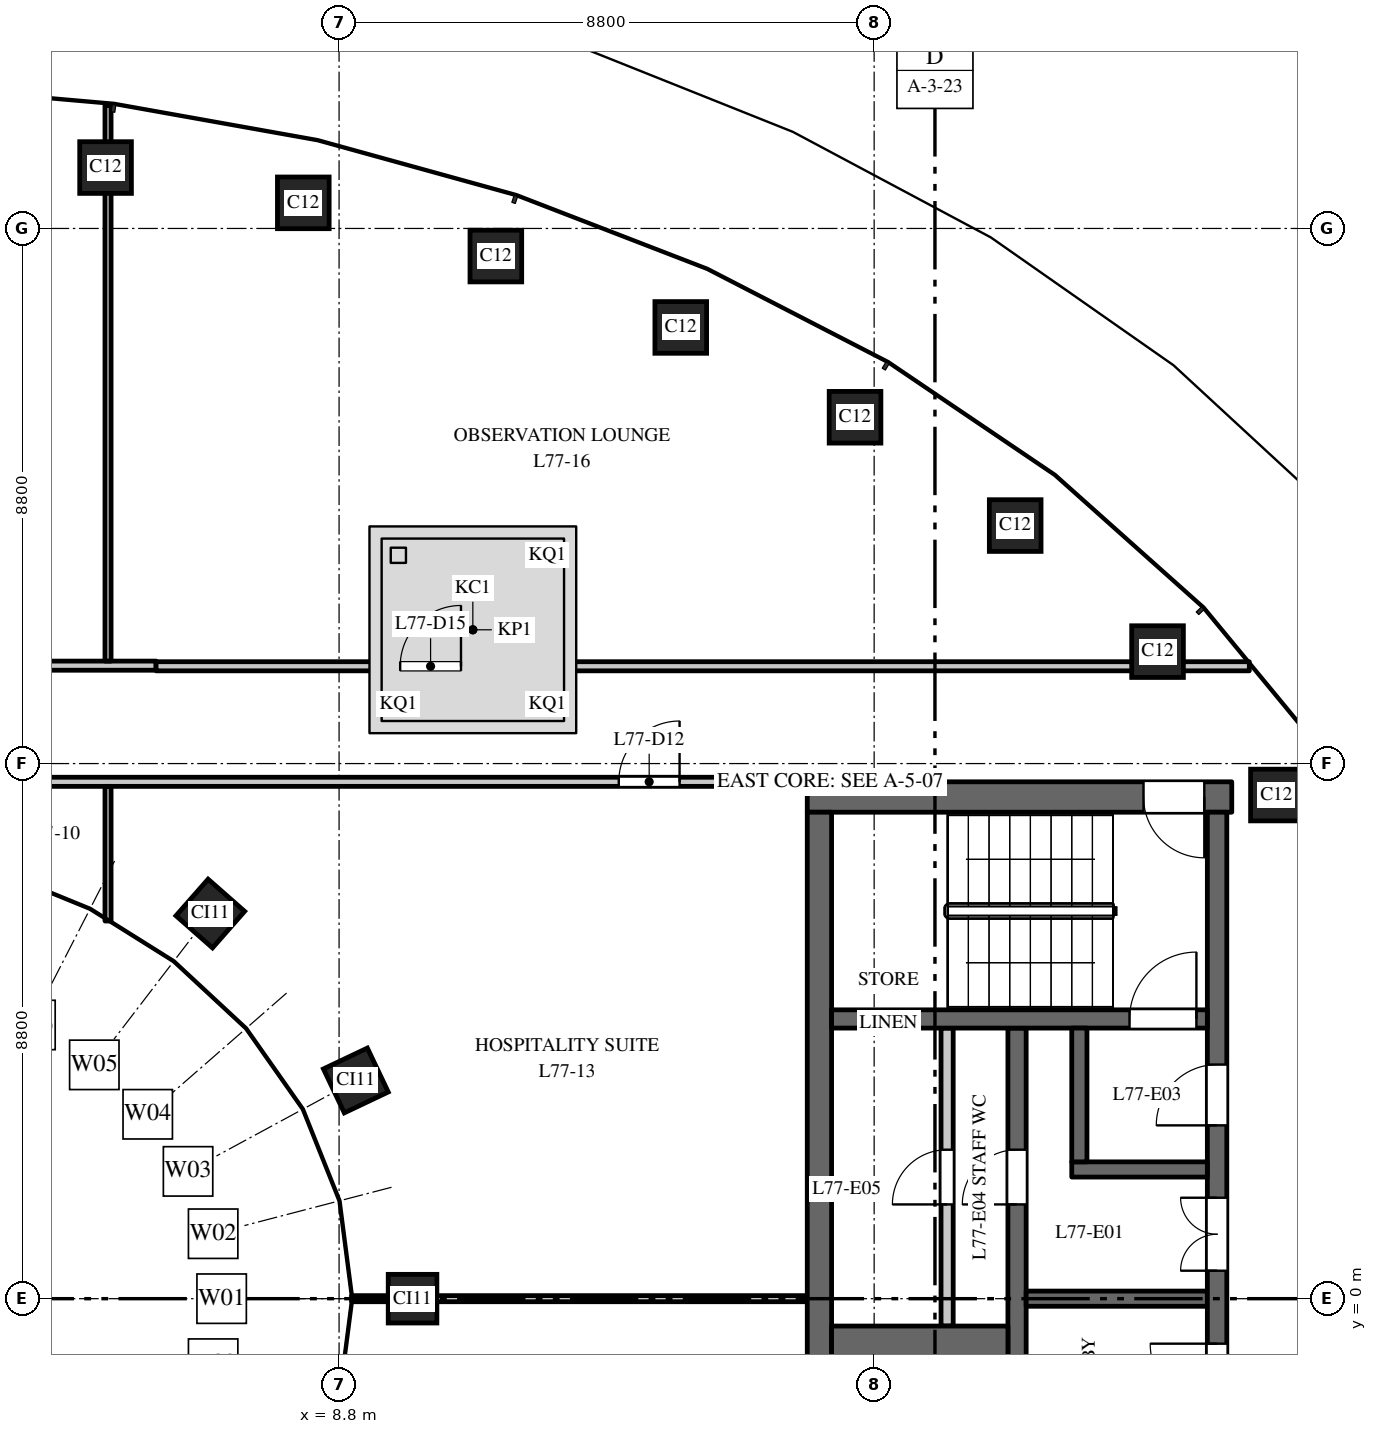
"""IFC4 building model, lengths in metres.
Left out: names, types, materials, properties, quantities, classifications, styles, units other than length and angle.
Written with IfcOpenShell. Run it as: python <this file> out.ifc"""

import sys

from ifc_helpers import new_model, si_unit, direction, frame, frame_2d, origin, origin_2d, place, context, subcontext, project, spatial, rectangle, extrude, element, fill, save


model = new_model("IFC4")
c1 = context("Model", 3, precision=1e-05, world=origin(), true_north=direction((0.0, 1.0)))
c2 = subcontext(c1, "Body", "Model", "MODEL_VIEW")
j1 = project(units=[si_unit("LENGTHUNIT", "METRE"), si_unit("PLANEANGLEUNIT", "RADIAN")], contexts=[c1])
p1 = place(None, origin())
s1 = spatial("IfcSite", under=j1, at=p1, CompositionType="ELEMENT")
p2 = place(p1, origin())
s2 = spatial("IfcBuilding", under=s1, at=p2, CompositionType="ELEMENT")
p3 = place(p2, frame((0.0, 0.0, 351.0)))
s3 = spatial("IfcBuildingStorey", under=s2, at=p3, CompositionType="ELEMENT", Elevation=351.0)
p4 = place(p3, frame((26.922, 0.0, 0.024), z_axis=(-0.671748348073, 0.0, 0.740779425242), x_axis=(0.0, -1.0, 0.0)))
e1 = element("IfcColumn", 1, at=p4, inside=s3, PredefinedType="COLUMN", context=c2, shape_type="SweptSolid", body=[
    extrude(rectangle(XDim=0.85, YDim=0.85, at=origin_2d()), origin(), (0.0, 0.0, 1.0), 7.392),
])
p5 = place(p3, frame((26.605, 2.884, 0.024), z_axis=(-0.663002424258, -0.107229988497, 0.740897776346), x_axis=(0.159659238674, -0.987172187365, 0.0)))
e2 = element("IfcColumn", 2, at=p5, inside=s3, PredefinedType="COLUMN", context=c2, shape_type="SweptSolid", body=[
    extrude(rectangle(XDim=0.85, YDim=0.85, at=origin_2d()), origin(), (0.0, 0.0, 1.0), 7.39),
])
p6 = place(p3, frame((25.682, 5.672, 0.058), z_axis=(-0.281200724754, -0.092390850742, 0.955191123858), x_axis=(0.312142088562, -0.950035429102, 0.0)))
e3 = element("IfcColumn", 3, at=p6, inside=s3, PredefinedType="COLUMN", context=c2, shape_type="SweptSolid", body=[
    extrude(rectangle(XDim=0.85, YDim=0.85, at=origin_2d()), origin(), (0.0, 0.0, 1.0), 5.697),
])
p7 = place(p3, frame((24.216, 8.282, 0.121), z_axis=(-0.025317754226, -0.012794994071, 0.999597568748), x_axis=(0.451048184688, -0.89249959949, 0.0)))
e4 = element("IfcColumn", 4, at=p7, inside=s3, PredefinedType="COLUMN", context=c2, shape_type="SweptSolid", body=[
    extrude(rectangle(XDim=0.85, YDim=0.85, at=origin_2d()), origin(), (0.0, 0.0, 1.0), 5.381),
])
p8 = place(p3, frame((22.261, 10.641, 0.02), z_axis=(-0.376654859375, -0.265757737453, 0.887414188467), x_axis=(0.57651482377, -0.817086689387, 0.0)))
e5 = element("IfcColumn", 5, at=p8, inside=s3, PredefinedType="COLUMN", context=c2, shape_type="SweptSolid", body=[
    extrude(rectangle(XDim=0.85, YDim=0.85, at=origin_2d()), origin(), (0.0, 0.0, 1.0), 6.175),
])
p9 = place(p3, frame((19.92, 12.714, 0.024), z_axis=(-0.48918887633, -0.459337710272, 0.7414196593), x_axis=(0.684514461897, -0.728999280832, 0.0)))
e6 = element("IfcColumn", 6, at=p9, inside=s3, PredefinedType="COLUMN", context=c2, shape_type="SweptSolid", body=[
    extrude(rectangle(XDim=0.85, YDim=0.85, at=origin_2d()), origin(), (0.0, 0.0, 1.0), 7.385),
])
p10 = place(p3, frame((17.286, 14.495, 0.024), z_axis=(-0.423361918772, -0.520740448808, 0.741346120722), x_axis=(0.77592413996, -0.630826227282, 0.0)))
e7 = element("IfcColumn", 7, at=p10, inside=s3, PredefinedType="COLUMN", context=c2, shape_type="SweptSolid", body=[
    extrude(rectangle(XDim=0.85, YDim=0.85, at=origin_2d()), origin(), (0.0, 0.0, 1.0), 7.386),
])
p11 = place(p3, frame((14.419, 15.972, 0.024), z_axis=(-0.352401023351, -0.571317311327, 0.741221996786), x_axis=(0.851111840755, -0.524984413604, 0.0)))
e8 = element("IfcColumn", 8, at=p11, inside=s3, PredefinedType="COLUMN", context=c2, shape_type="SweptSolid", body=[
    extrude(rectangle(XDim=0.85, YDim=0.85, at=origin_2d()), origin(), (0.0, 0.0, 1.0), 7.387),
])
p12 = place(p3, frame((11.378, 17.146, 0.024), z_axis=(-0.277631294914, -0.611304327055, 0.741099105254), x_axis=(0.910497899189, -0.41351369454, 0.0)))
e9 = element("IfcColumn", 9, at=p12, inside=s3, PredefinedType="COLUMN", context=c2, shape_type="SweptSolid", body=[
    extrude(rectangle(XDim=0.85, YDim=0.85, at=origin_2d()), origin(), (0.0, 0.0, 1.0), 7.388),
])
p13 = place(p3, frame((8.212, 18.021, 0.024), z_axis=(-0.200149570862, -0.640987425601, 0.74099613326), x_axis=(0.954547364195, -0.298059271805, 0.0)))
e10 = element("IfcColumn", 10, at=p13, inside=s3, PredefinedType="COLUMN", context=c2, shape_type="SweptSolid", body=[
    extrude(rectangle(XDim=0.85, YDim=0.85, at=origin_2d()), origin(), (0.0, 0.0, 1.0), 7.389),
])
p14 = place(p3, frame((4.96, 18.602, 0.024), z_axis=(-0.120810316709, -0.660641157657, 0.740917085905), x_axis=(0.983687598335, -0.179885265882, 0.0)))
e11 = element("IfcColumn", 11, at=p14, inside=s3, PredefinedType="COLUMN", context=c2, shape_type="SweptSolid", body=[
    extrude(rectangle(XDim=0.85, YDim=0.85, at=origin_2d()), origin(), (0.0, 0.0, 1.0), 7.39),
])
for number, where, z_axis, x_axis in (
    (12, (10.008, 0.0, 0.0), (0.0, 0.0, 1.0), (0.0, 1.0, 0.0)),
    (13, (9.076, 3.588, 0.0), (0.0, 0.0, 1.0), (-0.429, 0.903, 0.0)),
    (14, (6.682, 6.334, 0.0), (0.0, 0.0, 1.0), (-0.751, 0.66, 0.0)),
):
    element("IfcColumn", number, at=place(p3, frame(where, z_axis=z_axis, x_axis=x_axis)), inside=s3, PredefinedType="COLUMN", context=c2, shape_type="SweptSolid", body=[
        extrude(rectangle(XDim=0.8, YDim=0.8, at=origin_2d()), origin(), (0.0, 0.0, 1.0), 5.5),
    ])
p15 = place(p3, frame((16.5, 8.25, 0.0), z_axis=(0.0, 0.0, 1.0), x_axis=(1.0, 0.0, 0.0)))
e15 = element("IfcWall", 15, at=p15, inside=s3, PredefinedType="SHEAR", context=c2, shape_type="SweptSolid", body=[
    extrude(rectangle(XDim=6.981, YDim=0.5, at=frame_2d((3.491, 0.0))), origin(), (0.0, 0.0, 1.0), 5.3),
])
p16 = place(p15, frame((5.53, 0.0, 0.0)))
e16 = element("IfcOpeningElement", 16, at=p16, cuts=e15, PredefinedType="OPENING", context=c2, shape_type="SweptSolid", body=[
    extrude(rectangle(XDim=1.0, YDim=2.1, at=frame_2d((0.5, 1.05))), frame((0.0, 0.26, 0.0), z_axis=(0.0, -1.0, 0.0), x_axis=(1.0, 0.0, 0.0)), (0.0, 0.0, 1.0), 0.52),
])
p17 = place(p3, frame((18.8, -0.45, 0.0), z_axis=(0.0, 0.0, 1.0), x_axis=(0.0, 1.0, 0.0)))
e17 = element("IfcWall", 17, at=p17, inside=s3, PredefinedType="PARTITIONING", context=c2, shape_type="SweptSolid", body=[
    extrude(rectangle(XDim=4.9, YDim=0.2, at=frame_2d((2.45, 0.0))), origin(), (0.0, 0.0, 1.0), 4.5),
])
p18 = place(p17, frame((2.0, 0.0, 0.0)))
e18 = element("IfcOpeningElement", 18, at=p18, cuts=e17, PredefinedType="OPENING", context=c2, shape_type="SweptSolid", body=[
    extrude(rectangle(XDim=0.9, YDim=2.1, at=frame_2d((0.45, 1.05))), frame((0.0, 0.11, 0.0), z_axis=(0.0, -1.0, 0.0), x_axis=(1.0, 0.0, 0.0)), (0.0, 0.0, 1.0), 0.22),
])
p19 = place(p3, frame((19.95, -4.45, 0.0), z_axis=(0.0, 0.0, 1.0), x_axis=(0.0, 1.0, 0.0)))
e19 = element("IfcWall", 19, at=p19, inside=s3, PredefinedType="SHEAR", context=c2, shape_type="SweptSolid", body=[
    extrude(rectangle(XDim=8.9, YDim=0.3, at=frame_2d((4.45, 0.0))), origin(), (0.0, 0.0, 1.0), 5.3),
])
p20 = place(p19, frame((0.775, 0.0, 0.0)))
e20 = element("IfcOpeningElement", 20, at=p20, cuts=e19, PredefinedType="OPENING", context=c2, shape_type="SweptSolid", body=[
    extrude(rectangle(XDim=1.2, YDim=2.1, at=frame_2d((0.6, 1.05))), frame((0.0, 0.16, 0.0), z_axis=(0.0, -1.0, 0.0), x_axis=(1.0, 0.0, 0.0)), (0.0, 0.0, 1.0), 0.32),
])
p21 = place(p19, frame((6.0, 0.0, 0.0)))
e21 = element("IfcOpeningElement", 21, at=p21, cuts=e19, PredefinedType="OPENING", context=c2, shape_type="SweptSolid", body=[
    extrude(rectangle(XDim=0.9, YDim=2.1, at=frame_2d((0.45, 1.05))), frame((0.0, 0.16, 0.0), z_axis=(0.0, -1.0, 0.0), x_axis=(1.0, 0.0, 0.0)), (0.0, 0.0, 1.0), 0.32),
])
p22 = place(p3, frame((20.1, 0.0, 0.0), z_axis=(0.0, 0.0, 1.0), x_axis=(1.0, 0.0, 0.0)))
e22 = element("IfcWall", 22, at=p22, inside=s3, PredefinedType="SHEAR", context=c2, shape_type="SweptSolid", body=[
    extrude(rectangle(XDim=2.98, YDim=0.25, at=frame_2d((1.49, 0.0))), origin(), (0.0, 0.0, 1.0), 5.3),
])
p23 = place(p3, frame((16.7, -8.0, 0.0), z_axis=(0.0, 0.0, 1.0), x_axis=(0.0, 1.0, 0.0)))
e23 = element("IfcWall", 23, at=p23, inside=s3, PredefinedType="SHEAR", context=c2, shape_type="SweptSolid", body=[
    extrude(rectangle(XDim=16.0, YDim=0.4, at=frame_2d((8.0, 0.0))), origin(), (0.0, 0.0, 1.0), 5.3),
])
p24 = place(p3, frame((23.24, -8.0, 0.0), z_axis=(0.0, 0.0, 1.0), x_axis=(0.0, 1.0, 0.0)))
e24 = element("IfcWall", 24, at=p24, inside=s3, PredefinedType="SHEAR", context=c2, shape_type="SweptSolid", body=[
    extrude(rectangle(XDim=16.0, YDim=0.32, at=frame_2d((8.0, 0.0))), origin(), (0.0, 0.0, 1.0), 5.3),
])
p25 = place(p24, frame((6.16, 0.0, 0.0)))
e25 = element("IfcOpeningElement", 25, at=p25, cuts=e24, PredefinedType="OPENING", context=c2, shape_type="SweptSolid", body=[
    extrude(rectangle(XDim=1.1, YDim=2.1, at=frame_2d((0.55, 1.05))), frame((0.0, 0.17, 0.0), z_axis=(0.0, -1.0, 0.0), x_axis=(1.0, 0.0, 0.0)), (0.0, 0.0, 1.0), 0.34),
])
p26 = place(p24, frame((10.85, 0.0, 0.0)))
e26 = element("IfcOpeningElement", 26, at=p26, cuts=e24, PredefinedType="OPENING", context=c2, shape_type="SweptSolid", body=[
    extrude(rectangle(XDim=1.0, YDim=2.1, at=frame_2d((0.5, 1.05))), frame((0.0, 0.17, 0.0), z_axis=(0.0, -1.0, 0.0), x_axis=(1.0, 0.0, 0.0)), (0.0, 0.0, 1.0), 0.34),
])
p27 = place(p24, frame((8.46, 0.0, 0.0)))
e27 = element("IfcOpeningElement", 27, at=p27, cuts=e24, PredefinedType="OPENING", context=c2, shape_type="SweptSolid", body=[
    extrude(rectangle(XDim=1.2, YDim=2.1, at=frame_2d((0.6, 1.05))), frame((0.0, 0.17, 0.0), z_axis=(0.0, -1.0, 0.0), x_axis=(1.0, 0.0, 0.0)), (0.0, 0.0, 1.0), 0.34),
])
p28 = place(p3, frame((16.9, -1.075, 0.0), z_axis=(0.0, 0.0, 1.0), x_axis=(1.0, 0.0, 0.0)))
e28 = element("IfcWall", 28, at=p28, inside=s3, PredefinedType="SHEAR", context=c2, shape_type="SweptSolid", body=[
    extrude(rectangle(XDim=2.9, YDim=1.25, at=frame_2d((1.45, 0.0))), origin(), (0.0, 0.0, 1.0), 5.3),
])
p29 = place(p3, frame((16.9, 4.6, 0.0), z_axis=(0.0, 0.0, 1.0), x_axis=(1.0, 0.0, 0.0)))
e29 = element("IfcWall", 29, at=p29, inside=s3, PredefinedType="SHEAR", context=c2, shape_type="SweptSolid", body=[
    extrude(rectangle(XDim=6.18, YDim=0.3, at=frame_2d((3.09, 0.0))), origin(), (0.0, 0.0, 1.0), 5.3),
])
p30 = place(p29, frame((4.9, 0.0, 0.0)))
e30 = element("IfcOpeningElement", 30, at=p30, cuts=e29, PredefinedType="OPENING", context=c2, shape_type="SweptSolid", body=[
    extrude(rectangle(XDim=1.1, YDim=2.1, at=frame_2d((0.55, 1.05))), frame((0.0, 0.16, 0.0), z_axis=(0.0, -1.0, 0.0), x_axis=(1.0, 0.0, 0.0)), (0.0, 0.0, 1.0), 0.32),
])
p31 = place(p3, frame((20.85, 2.125, 0.0), z_axis=(0.0, 0.0, 1.0), x_axis=(1.0, 0.0, 0.0)))
e31 = element("IfcWall", 31, at=p31, inside=s3, PredefinedType="SHEAR", context=c2, shape_type="SweptSolid", body=[
    extrude(rectangle(XDim=2.23, YDim=0.25, at=frame_2d((1.115, 0.0))), origin(), (0.0, 0.0, 1.0), 5.3),
])
p32 = place(p3, frame((20.975, 2.25, 0.0), z_axis=(0.0, 0.0, 1.0), x_axis=(0.0, 1.0, 0.0)))
e32 = element("IfcWall", 32, at=p32, inside=s3, PredefinedType="SHEAR", context=c2, shape_type="SweptSolid", body=[
    extrude(rectangle(XDim=2.2, YDim=0.25, at=frame_2d((1.1, 0.0))), origin(), (0.0, 0.0, 1.0), 5.3),
])
p33 = place(p3, frame((-15.036, 8.5, 0.0), z_axis=(0.0, 0.0, 1.0), x_axis=(1.0, 0.0, 0.0)))
e33 = element("IfcWall", 33, at=p33, inside=s3, PredefinedType="PARTITIONING", context=c2, shape_type="SweptSolid", body=[
    extrude(rectangle(XDim=30.072, YDim=0.15, at=frame_2d((15.036, 0.0))), origin(), (0.0, 0.0, 1.0), 4.5),
])
p34 = place(p33, frame((0.65, 0.0, 0.0)))
e34 = element("IfcOpeningElement", 34, at=p34, cuts=e33, PredefinedType="OPENING", context=c2, shape_type="SweptSolid", body=[
    extrude(rectangle(XDim=1.0, YDim=2.1, at=frame_2d((0.5, 1.05))), frame((0.0, 0.085, 0.0), z_axis=(0.0, -1.0, 0.0), x_axis=(1.0, 0.0, 0.0)), (0.0, 0.0, 1.0), 0.17),
])
p35 = place(p33, frame((12.686, 0.0, 0.0)))
e35 = element("IfcOpeningElement", 35, at=p35, cuts=e33, PredefinedType="OPENING", context=c2, shape_type="SweptSolid", body=[
    extrude(rectangle(XDim=1.0, YDim=2.1, at=frame_2d((0.5, 1.05))), frame((0.0, 0.085, 0.0), z_axis=(0.0, -1.0, 0.0), x_axis=(1.0, 0.0, 0.0)), (0.0, 0.0, 1.0), 0.17),
])
p36 = place(p33, frame((28.436, 0.0, 0.0)))
e36 = element("IfcOpeningElement", 36, at=p36, cuts=e33, PredefinedType="OPENING", context=c2, shape_type="SweptSolid", body=[
    extrude(rectangle(XDim=1.0, YDim=2.1, at=frame_2d((0.5, 1.05))), frame((0.0, 0.085, 0.0), z_axis=(0.0, -1.0, 0.0), x_axis=(1.0, 0.0, 0.0)), (0.0, 0.0, 1.0), 0.17),
])
p37 = place(p3, frame((-5.79, 10.41, 0.0), z_axis=(0.0, 0.0, 1.0), x_axis=(1.0, 0.0, 0.0)))
e37 = element("IfcWall", 37, at=p37, inside=s3, PredefinedType="PARTITIONING", context=c2, shape_type="SweptSolid", body=[
    extrude(rectangle(XDim=11.58, YDim=0.15, at=frame_2d((5.79, 0.0))), origin(), (0.0, 0.0, 1.0), 4.7),
])
p38 = place(p37, frame((1.39, 0.0, 0.0)))
e38 = element("IfcOpeningElement", 38, at=p38, cuts=e37, PredefinedType="OPENING", context=c2, shape_type="SweptSolid", body=[
    extrude(rectangle(XDim=1.0, YDim=2.1, at=frame_2d((0.5, 1.05))), frame((0.0, 0.085, 0.0), z_axis=(0.0, -1.0, 0.0), x_axis=(1.0, 0.0, 0.0)), (0.0, 0.0, 1.0), 0.17),
])
p39 = place(p3, frame((5.0, 6.211, 0.0), z_axis=(0.0, 0.0, 1.0), x_axis=(0.0, 1.0, 0.0)))
e39 = element("IfcWall", 39, at=p39, inside=s3, PredefinedType="PARTITIONING", context=c2, shape_type="SweptSolid", body=[
    extrude(rectangle(XDim=2.214, YDim=0.1, at=frame_2d((1.107, 0.0))), origin(), (0.0, 0.0, 1.0), 4.5),
])
p40 = place(p3, frame((5.0, 10.485, 0.0), z_axis=(0.0, 0.0, 1.0), x_axis=(0.0, 1.0, 0.0)))
e40 = element("IfcWall", 40, at=p40, inside=s3, PredefinedType="PARTITIONING", context=c2, shape_type="SweptSolid", body=[
    extrude(rectangle(XDim=9.135, YDim=0.1, at=frame_2d((4.567, 0.0))), origin(), (0.0, 0.0, 1.0), 4.5),
])
p41 = place(p3, frame((5.79, 10.4, 0.0), z_axis=(0.0, 0.0, 1.0), x_axis=(1.0, 0.0, 0.0)))
e41 = element("IfcWall", 41, at=p41, inside=s3, PredefinedType="PARTITIONING", context=c2, shape_type="SweptSolid", body=[
    extrude(rectangle(XDim=17.98, YDim=0.15, at=frame_2d((8.99, 0.0))), origin(), (0.0, 0.0, 1.0), 4.5),
])
p42 = place(p41, frame((4.015, 0.0, 0.0)))
e42 = element("IfcOpeningElement", 42, at=p42, cuts=e41, PredefinedType="OPENING", context=c2, shape_type="SweptSolid", body=[
    extrude(rectangle(XDim=1.0, YDim=2.1, at=frame_2d((0.5, 1.05))), frame((0.0, 0.085, 0.0), z_axis=(0.0, -1.0, 0.0), x_axis=(1.0, 0.0, 0.0)), (0.0, 0.0, 1.0), 0.17),
])
p43 = place(p3, frame((9.005, 0.0, 0.0), z_axis=(0.0, 0.0, 1.0), x_axis=(1.0, 0.0, 0.0)))
e43 = element("IfcWall", 43, at=p43, inside=s3, PredefinedType="PARTITIONING", context=c2, shape_type="SweptSolid", body=[
    extrude(rectangle(XDim=7.495, YDim=0.1, at=frame_2d((3.748, 0.0))), origin(), (0.0, 0.0, 1.0), 4.2),
])
p44 = place(p30, origin())
e44 = element("IfcDoor", 44, at=p44, inside=s3, OperationType="SINGLE_SWING_LEFT", PredefinedType="DOOR", context=c2, shape_type="SweptSolid", body=[
    extrude(rectangle(XDim=1.1, YDim=2.1, at=frame_2d((0.55, 1.05))), frame((0.0, 0.025, 0.0), z_axis=(0.0, -1.0, 0.0), x_axis=(1.0, 0.0, 0.0)), (0.0, 0.0, 1.0), 0.05),
])
fill(e30, e44)
p45 = place(p25, origin())
e45 = element("IfcDoor", 45, at=p45, inside=s3, OperationType="SINGLE_SWING_LEFT", PredefinedType="DOOR", context=c2, shape_type="SweptSolid", body=[
    extrude(rectangle(XDim=1.1, YDim=2.1, at=frame_2d((0.55, 1.05))), frame((0.0, 0.025, 0.0), z_axis=(0.0, -1.0, 0.0), x_axis=(1.0, 0.0, 0.0)), (0.0, 0.0, 1.0), 0.05),
])
fill(e25, e45)
p46 = place(p26, origin())
e46 = element("IfcDoor", 46, at=p46, inside=s3, OperationType="SINGLE_SWING_RIGHT", PredefinedType="DOOR", context=c2, shape_type="SweptSolid", body=[
    extrude(rectangle(XDim=1.0, YDim=2.1, at=frame_2d((0.5, 1.05))), frame((0.0, 0.025, 0.0), z_axis=(0.0, -1.0, 0.0), x_axis=(1.0, 0.0, 0.0)), (0.0, 0.0, 1.0), 0.05),
])
fill(e26, e46)
p47 = place(p27, origin())
e47 = element("IfcDoor", 47, at=p47, inside=s3, OperationType="DOUBLE_DOOR_DOUBLE_SWING", PredefinedType="DOOR", context=c2, shape_type="SweptSolid", body=[
    extrude(rectangle(XDim=1.2, YDim=2.1, at=frame_2d((0.6, 1.05))), frame((0.0, 0.025, 0.0), z_axis=(0.0, -1.0, 0.0), x_axis=(1.0, 0.0, 0.0)), (0.0, 0.0, 1.0), 0.05),
])
fill(e27, e47)
p48 = place(p16, origin())
e48 = element("IfcDoor", 48, at=p48, inside=s3, OperationType="SINGLE_SWING_RIGHT", PredefinedType="DOOR", context=c2, shape_type="SweptSolid", body=[
    extrude(rectangle(XDim=1.0, YDim=2.1, at=frame_2d((0.5, 1.05))), frame((0.0, 0.025, 0.0), z_axis=(0.0, -1.0, 0.0), x_axis=(1.0, 0.0, 0.0)), (0.0, 0.0, 1.0), 0.05),
])
fill(e16, e48)
p49 = place(p21, origin())
e49 = element("IfcDoor", 49, at=p49, inside=s3, OperationType="SINGLE_SWING_RIGHT", PredefinedType="DOOR", context=c2, shape_type="SweptSolid", body=[
    extrude(rectangle(XDim=0.9, YDim=2.1, at=frame_2d((0.45, 1.05))), frame((0.0, 0.025, 0.0), z_axis=(0.0, -1.0, 0.0), x_axis=(1.0, 0.0, 0.0)), (0.0, 0.0, 1.0), 0.05),
])
fill(e21, e49)
p50 = place(p18, origin())
e50 = element("IfcDoor", 50, at=p50, inside=s3, OperationType="SINGLE_SWING_RIGHT", PredefinedType="DOOR", context=c2, shape_type="SweptSolid", body=[
    extrude(rectangle(XDim=0.9, YDim=2.1, at=frame_2d((0.45, 1.05))), frame((0.0, 0.025, 0.0), z_axis=(0.0, -1.0, 0.0), x_axis=(1.0, 0.0, 0.0)), (0.0, 0.0, 1.0), 0.05),
])
fill(e18, e50)
p51 = place(p36, origin())
e51 = element("IfcDoor", 51, at=p51, inside=s3, OperationType="SINGLE_SWING_RIGHT", PredefinedType="DOOR", context=c2, shape_type="SweptSolid", body=[
    extrude(rectangle(XDim=1.0, YDim=2.1, at=frame_2d((0.5, 1.05))), frame((0.0, 0.025, 0.0), z_axis=(0.0, -1.0, 0.0), x_axis=(1.0, 0.0, 0.0)), (0.0, 0.0, 1.0), 0.05),
])
fill(e36, e51)
p52 = place(p42, origin())
e52 = element("IfcDoor", 52, at=p52, inside=s3, OperationType="SINGLE_SWING_RIGHT", PredefinedType="DOOR", context=c2, shape_type="SweptSolid", body=[
    extrude(rectangle(XDim=1.0, YDim=2.1, at=frame_2d((0.5, 1.05))), frame((0.0, 0.025, 0.0), z_axis=(0.0, -1.0, 0.0), x_axis=(1.0, 0.0, 0.0)), (0.0, 0.0, 1.0), 0.05),
])
fill(e42, e52)
save(model, sys.argv[1])
